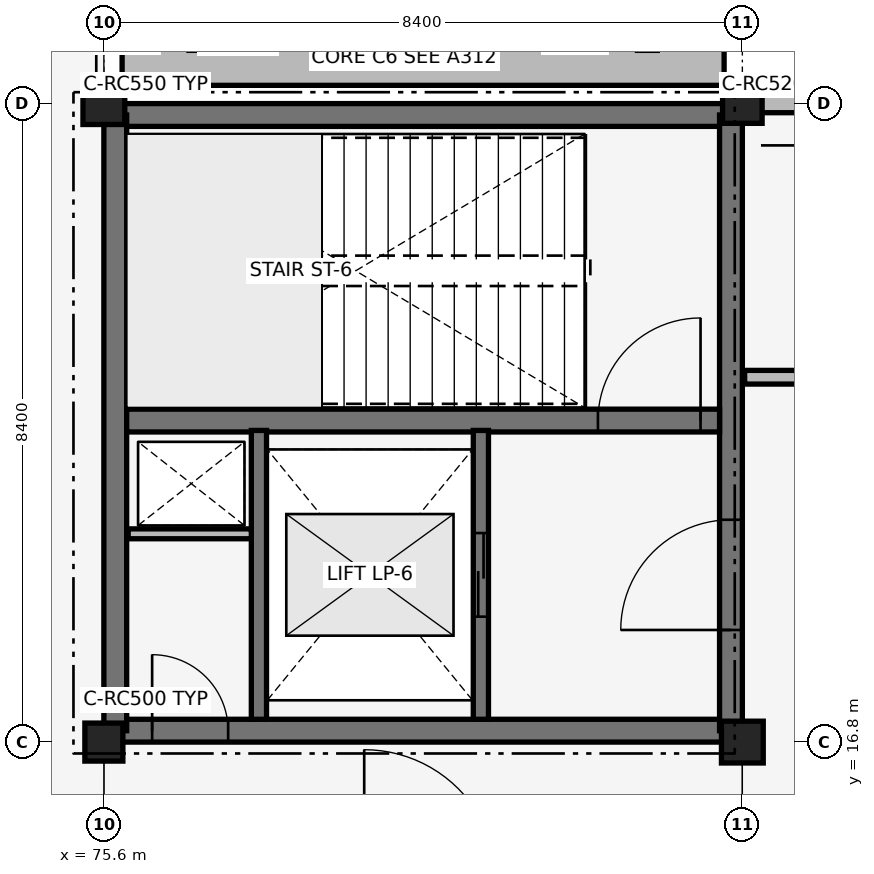
"""IFC4 building model, lengths in metres.
Left out: names, types, materials, properties, quantities, classifications, styles, units other than length and angle.
Written with IfcOpenShell. Run it as: python <this file> out.ifc"""

import sys

from ifc_helpers import new_model, si_unit, direction, frame, frame_2d, origin, origin_2d, place, context, subcontext, project, spatial, rectangle, extrude, element, fill, save


model = new_model("IFC4")
c1 = context("Model", 3, precision=1e-05, world=origin(), true_north=direction((0.0, 1.0)))
c2 = subcontext(c1, "Body", "Model", "MODEL_VIEW")
j1 = project(units=[si_unit("LENGTHUNIT", "METRE"), si_unit("PLANEANGLEUNIT", "RADIAN")], contexts=[c1])
p1 = place(None, origin())
s1 = spatial("IfcSite", under=j1, at=p1, CompositionType="ELEMENT")
p2 = place(p1, origin())
s2 = spatial("IfcBuilding", under=s1, at=p2, CompositionType="ELEMENT")
p3 = place(p2, frame((0.0, 0.0, 5.44)))
s3 = spatial("IfcBuildingStorey", under=s2, at=p3, CompositionType="ELEMENT", Elevation=5.44)
p4 = place(p3, frame((75.75, 16.95, 0.0), z_axis=(0.0, 0.0, 1.0), x_axis=(1.0, 0.0, 0.0)))
e1 = element("IfcWall", 1, at=p4, inside=s3, PredefinedType="SHEAR", context=c2, shape_type="SweptSolid", body=[
    extrude(rectangle(XDim=8.1, YDim=0.3, at=frame_2d((4.05, 0.0))), origin(), (0.0, 0.0, 1.0), 4.12),
])
p5 = place(p4, frame((0.485, 0.0, 0.0)))
e2 = element("IfcOpeningElement", 2, at=p5, cuts=e1, PredefinedType="OPENING", context=c2, shape_type="SweptSolid", body=[
    extrude(rectangle(XDim=1.0, YDim=2.15, at=frame_2d((0.5, 1.075))), frame((0.0, 0.16, 0.0), z_axis=(0.0, -1.0, 0.0), x_axis=(1.0, 0.0, 0.0)), (0.0, 0.0, 1.0), 0.32),
])
for number, where, z_axis, x_axis in (
    (3, (75.75, 25.05, 0.0), (0.0, 0.0, 1.0), (1.0, 0.0, 0.0)),
    (4, (75.75, 16.95, 0.0), (0.0, 0.0, 1.0), (0.0, 1.0, 0.0)),
):
    element("IfcWall", number, at=place(p3, frame(where, z_axis=z_axis, x_axis=x_axis)), inside=s3, PredefinedType="SHEAR", context=c2, shape_type="SweptSolid", body=[
        extrude(rectangle(XDim=8.1, YDim=0.3, at=frame_2d((4.05, 0.0))), origin(), (0.0, 0.0, 1.0), 4.12),
    ])
p6 = place(p3, frame((83.85, 16.95, 0.0), z_axis=(0.0, 0.0, 1.0), x_axis=(0.0, 1.0, 0.0)))
e5 = element("IfcWall", 5, at=p6, inside=s3, PredefinedType="SHEAR", context=c2, shape_type="SweptSolid", body=[
    extrude(rectangle(XDim=8.1, YDim=0.3, at=frame_2d((4.05, 0.0))), origin(), (0.0, 0.0, 1.0), 4.12),
])
p7 = place(p6, frame((1.325, 0.0, 0.0)))
e6 = element("IfcOpeningElement", 6, at=p7, cuts=e5, PredefinedType="OPENING", context=c2, shape_type="SweptSolid", body=[
    extrude(rectangle(XDim=1.45, YDim=2.15, at=frame_2d((0.725, 1.075))), frame((0.0, 0.16, 0.0), z_axis=(0.0, -1.0, 0.0), x_axis=(1.0, 0.0, 0.0)), (0.0, 0.0, 1.0), 0.32),
])
p8 = place(p3, frame((75.9, 21.03, 0.0), z_axis=(0.0, 0.0, 1.0), x_axis=(1.0, 0.0, 0.0)))
e7 = element("IfcWall", 7, at=p8, inside=s3, PredefinedType="SHEAR", context=c2, shape_type="SweptSolid", body=[
    extrude(rectangle(XDim=7.8, YDim=0.3, at=frame_2d((3.9, 0.0))), origin(), (0.0, 0.0, 1.0), 4.12),
])
p9 = place(p8, frame((6.2, 0.0, 0.0)))
e8 = element("IfcOpeningElement", 8, at=p9, cuts=e7, PredefinedType="OPENING", context=c2, shape_type="SweptSolid", body=[
    extrude(rectangle(XDim=1.35, YDim=2.15, at=frame_2d((0.675, 1.075))), frame((0.0, 0.16, 0.0), z_axis=(0.0, -1.0, 0.0), x_axis=(1.0, 0.0, 0.0)), (0.0, 0.0, 1.0), 0.32),
])
p10 = place(p3, frame((75.6, 16.8, 0.0), z_axis=(0.0, 0.0, 1.0), x_axis=(1.0, 0.0, 0.0)))
e9 = element("IfcColumn", 9, at=p10, inside=s3, PredefinedType="COLUMN", context=c2, shape_type="SweptSolid", body=[
    extrude(rectangle(XDim=0.5, YDim=0.5, at=origin_2d()), origin(), (0.0, 0.0, 1.0), 4.12),
])
for number, where, z_axis, x_axis in (
    (10, (75.6, 25.2, 0.0), (0.0, 0.0, 1.0), (1.0, 0.0, 0.0)),
    (11, (84.0, 16.8, 0.0), (0.0, 0.0, 1.0), (1.0, 0.0, 0.0)),
):
    element("IfcColumn", number, at=place(p3, frame(where, z_axis=z_axis, x_axis=x_axis)), inside=s3, PredefinedType="COLUMN", context=c2, shape_type="SweptSolid", body=[
        extrude(rectangle(XDim=0.55, YDim=0.55, at=origin_2d()), origin(), (0.0, 0.0, 1.0), 4.12),
    ])
p11 = place(p3, frame((84.0, 25.2, 0.0), z_axis=(0.0, 0.0, 1.0), x_axis=(1.0, 0.0, 0.0)))
e12 = element("IfcColumn", 12, at=p11, inside=s3, PredefinedType="COLUMN", context=c2, shape_type="SweptSolid", body=[
    extrude(rectangle(XDim=0.52, YDim=0.52, at=origin_2d()), origin(), (0.0, 0.0, 1.0), 4.12),
])
p12 = place(p3, frame((75.84, 25.68, 0.0), z_axis=(0.0, 0.0, 1.0), x_axis=(1.0, 0.0, 0.0)))
e13 = element("IfcWall", 13, at=p12, inside=s3, PredefinedType="SOLIDWALL", context=c2, shape_type="SweptSolid", body=[
    extrude(rectangle(XDim=7.92, YDim=0.48, at=frame_2d((3.96, 0.0))), origin(), (0.0, 0.0, 1.0), 4.42),
])
p13 = place(p3, frame((84.245, 25.2, 0.0), z_axis=(0.0, 0.0, 1.0), x_axis=(1.0, 0.0, 0.0)))
e14 = element("IfcWall", 14, at=p13, inside=s3, PredefinedType="SOLIDWALL", context=c2, shape_type="SweptSolid", body=[
    extrude(rectangle(XDim=7.895, YDim=0.24, at=frame_2d((3.947, 0.0))), origin(), (0.0, 0.0, 1.0), 3.37),
])
p14 = place(p13, frame((0.81, 0.0, 0.35)))
e15 = element("IfcOpeningElement", 15, at=p14, cuts=e14, PredefinedType="OPENING", context=c2, shape_type="SweptSolid", body=[
    extrude(rectangle(XDim=0.44, YDim=1.25, at=frame_2d((0.22, 0.625))), frame((0.0, 0.13, 0.0), z_axis=(0.0, -1.0, 0.0), x_axis=(1.0, 0.0, 0.0)), (0.0, 0.0, 1.0), 0.26),
])
p15 = place(p13, frame((2.269, 0.0, 0.35)))
e16 = element("IfcOpeningElement", 16, at=p15, cuts=e14, PredefinedType="OPENING", context=c2, shape_type="SweptSolid", body=[
    extrude(rectangle(XDim=0.44, YDim=1.25, at=frame_2d((0.22, 0.625))), frame((0.0, 0.13, 0.0), z_axis=(0.0, -1.0, 0.0), x_axis=(1.0, 0.0, 0.0)), (0.0, 0.0, 1.0), 0.26),
])
p16 = place(p13, frame((3.728, 0.0, 0.35)))
e17 = element("IfcOpeningElement", 17, at=p16, cuts=e14, PredefinedType="OPENING", context=c2, shape_type="SweptSolid", body=[
    extrude(rectangle(XDim=0.44, YDim=1.25, at=frame_2d((0.22, 0.625))), frame((0.0, 0.13, 0.0), z_axis=(0.0, -1.0, 0.0), x_axis=(1.0, 0.0, 0.0)), (0.0, 0.0, 1.0), 0.26),
])
p17 = place(p13, frame((5.187, 0.0, 0.35)))
e18 = element("IfcOpeningElement", 18, at=p17, cuts=e14, PredefinedType="OPENING", context=c2, shape_type="SweptSolid", body=[
    extrude(rectangle(XDim=0.44, YDim=1.25, at=frame_2d((0.22, 0.625))), frame((0.0, 0.13, 0.0), z_axis=(0.0, -1.0, 0.0), x_axis=(1.0, 0.0, 0.0)), (0.0, 0.0, 1.0), 0.26),
])
p18 = place(p13, frame((6.646, 0.0, 0.35)))
e19 = element("IfcOpeningElement", 19, at=p18, cuts=e14, PredefinedType="OPENING", context=c2, shape_type="SweptSolid", body=[
    extrude(rectangle(XDim=0.44, YDim=1.25, at=frame_2d((0.22, 0.625))), frame((0.0, 0.13, 0.0), z_axis=(0.0, -1.0, 0.0), x_axis=(1.0, 0.0, 0.0)), (0.0, 0.0, 1.0), 0.26),
])
p19 = place(p13, frame((0.81, 0.0, 1.8)))
e20 = element("IfcOpeningElement", 20, at=p19, cuts=e14, PredefinedType="OPENING", context=c2, shape_type="SweptSolid", body=[
    extrude(rectangle(XDim=0.44, YDim=1.25, at=frame_2d((0.22, 0.625))), frame((0.0, 0.13, 0.0), z_axis=(0.0, -1.0, 0.0), x_axis=(1.0, 0.0, 0.0)), (0.0, 0.0, 1.0), 0.26),
])
p20 = place(p13, frame((2.269, 0.0, 1.8)))
e21 = element("IfcOpeningElement", 21, at=p20, cuts=e14, PredefinedType="OPENING", context=c2, shape_type="SweptSolid", body=[
    extrude(rectangle(XDim=0.44, YDim=1.25, at=frame_2d((0.22, 0.625))), frame((0.0, 0.13, 0.0), z_axis=(0.0, -1.0, 0.0), x_axis=(1.0, 0.0, 0.0)), (0.0, 0.0, 1.0), 0.26),
])
p21 = place(p13, frame((3.728, 0.0, 1.8)))
e22 = element("IfcOpeningElement", 22, at=p21, cuts=e14, PredefinedType="OPENING", context=c2, shape_type="SweptSolid", body=[
    extrude(rectangle(XDim=0.44, YDim=1.25, at=frame_2d((0.22, 0.625))), frame((0.0, 0.13, 0.0), z_axis=(0.0, -1.0, 0.0), x_axis=(1.0, 0.0, 0.0)), (0.0, 0.0, 1.0), 0.26),
])
p22 = place(p13, frame((5.187, 0.0, 1.8)))
e23 = element("IfcOpeningElement", 23, at=p22, cuts=e14, PredefinedType="OPENING", context=c2, shape_type="SweptSolid", body=[
    extrude(rectangle(XDim=0.44, YDim=1.25, at=frame_2d((0.22, 0.625))), frame((0.0, 0.13, 0.0), z_axis=(0.0, -1.0, 0.0), x_axis=(1.0, 0.0, 0.0)), (0.0, 0.0, 1.0), 0.26),
])
p23 = place(p13, frame((6.646, 0.0, 1.8)))
e24 = element("IfcOpeningElement", 24, at=p23, cuts=e14, PredefinedType="OPENING", context=c2, shape_type="SweptSolid", body=[
    extrude(rectangle(XDim=0.44, YDim=1.25, at=frame_2d((0.22, 0.625))), frame((0.0, 0.13, 0.0), z_axis=(0.0, -1.0, 0.0), x_axis=(1.0, 0.0, 0.0)), (0.0, 0.0, 1.0), 0.26),
])
p24 = place(p3, frame((80.56, 17.1, 0.0), z_axis=(0.0, 0.0, 1.0), x_axis=(0.0, 1.0, 0.0)))
e25 = element("IfcWall", 25, at=p24, inside=s3, PredefinedType="SHEAR", context=c2, shape_type="SweptSolid", body=[
    extrude(rectangle(XDim=3.8, YDim=0.2, at=frame_2d((1.9, 0.0))), origin(), (0.0, 0.0, 1.0), 3.34),
])
p25 = place(p24, frame((1.35, 0.0, 0.0)))
e26 = element("IfcOpeningElement", 26, at=p25, cuts=e25, PredefinedType="OPENING", context=c2, shape_type="SweptSolid", body=[
    extrude(rectangle(XDim=1.1, YDim=2.15, at=frame_2d((0.55, 1.075))), frame((0.0, 0.11, 0.0), z_axis=(0.0, -1.0, 0.0), x_axis=(1.0, 0.0, 0.0)), (0.0, 0.0, 1.0), 0.22),
])
p26 = place(p3, frame((77.64, 17.1, 0.0), z_axis=(0.0, 0.0, 1.0), x_axis=(0.0, 1.0, 0.0)))
e27 = element("IfcWall", 27, at=p26, inside=s3, PredefinedType="SHEAR", context=c2, shape_type="SweptSolid", body=[
    extrude(rectangle(XDim=3.8, YDim=0.2, at=frame_2d((1.9, 0.0))), origin(), (0.0, 0.0, 1.0), 3.34),
])
p27 = place(p3, frame((75.92, 19.54, 0.0), z_axis=(0.0, 0.0, 1.0), x_axis=(1.0, 0.0, 0.0)))
e28 = element("IfcWall", 28, at=p27, inside=s3, PredefinedType="PARTITIONING", context=c2, shape_type="SweptSolid", body=[
    extrude(rectangle(XDim=1.62, YDim=0.13, at=frame_2d((0.81, 0.0))), origin(), (0.0, 0.0, 1.0), 4.12),
])
p28 = place(p3, frame((84.03, 21.6, 0.0), z_axis=(0.0, 0.0, 1.0), x_axis=(1.0, 0.0, 0.0)))
e29 = element("IfcWall", 29, at=p28, inside=s3, PredefinedType="PARTITIONING", context=c2, shape_type="SweptSolid", body=[
    extrude(rectangle(XDim=20.62, YDim=0.18, at=frame_2d((10.31, 0.0))), origin(), (0.0, 0.0, 1.0), 3.47),
])
p29 = place(p28, frame((9.435, 0.0, 0.0)))
e30 = element("IfcOpeningElement", 30, at=p29, cuts=e29, PredefinedType="OPENING", context=c2, shape_type="SweptSolid", body=[
    extrude(rectangle(XDim=1.75, YDim=2.3, at=frame_2d((0.875, 1.15))), frame((0.0, 0.1, 0.0), z_axis=(0.0, -1.0, 0.0), x_axis=(1.0, 0.0, 0.0)), (0.0, 0.0, 1.0), 0.2),
])
p30 = place(p9, origin())
e31 = element("IfcDoor", 31, at=p30, inside=s3, OperationType="SINGLE_SWING_RIGHT", PredefinedType="DOOR", context=c2, shape_type="SweptSolid", body=[
    extrude(rectangle(XDim=1.35, YDim=2.15, at=frame_2d((0.675, 1.075))), frame((0.0, 0.025, 0.0), z_axis=(0.0, -1.0, 0.0), x_axis=(1.0, 0.0, 0.0)), (0.0, 0.0, 1.0), 0.05),
])
fill(e8, e31)
p31 = place(p25, origin())
e32 = element("IfcDoor", 32, at=p31, inside=s3, OperationType="SLIDING_TO_LEFT", PredefinedType="DOOR", context=c2, shape_type="SweptSolid", body=[
    extrude(rectangle(XDim=1.1, YDim=2.15, at=frame_2d((0.55, 1.075))), frame((0.0, 0.025, 0.0), z_axis=(0.0, -1.0, 0.0), x_axis=(1.0, 0.0, 0.0)), (0.0, 0.0, 1.0), 0.05),
])
fill(e26, e32)
p32 = place(p7, origin())
e33 = element("IfcDoor", 33, at=p32, inside=s3, OperationType="DOUBLE_DOOR_SINGLE_SWING", PredefinedType="DOOR", context=c2, shape_type="SweptSolid", body=[
    extrude(rectangle(XDim=1.45, YDim=2.15, at=frame_2d((0.725, 1.075))), frame((0.0, 0.025, 0.0), z_axis=(0.0, -1.0, 0.0), x_axis=(1.0, 0.0, 0.0)), (0.0, 0.0, 1.0), 0.05),
])
fill(e6, e33)
p33 = place(p5, origin())
e34 = element("IfcDoor", 34, at=p33, inside=s3, OperationType="SINGLE_SWING_LEFT", PredefinedType="DOOR", context=c2, shape_type="SweptSolid", body=[
    extrude(rectangle(XDim=1.0, YDim=2.15, at=frame_2d((0.5, 1.075))), frame((0.0, 0.025, 0.0), z_axis=(0.0, -1.0, 0.0), x_axis=(1.0, 0.0, 0.0)), (0.0, 0.0, 1.0), 0.05),
])
fill(e2, e34)
save(model, sys.argv[1])
